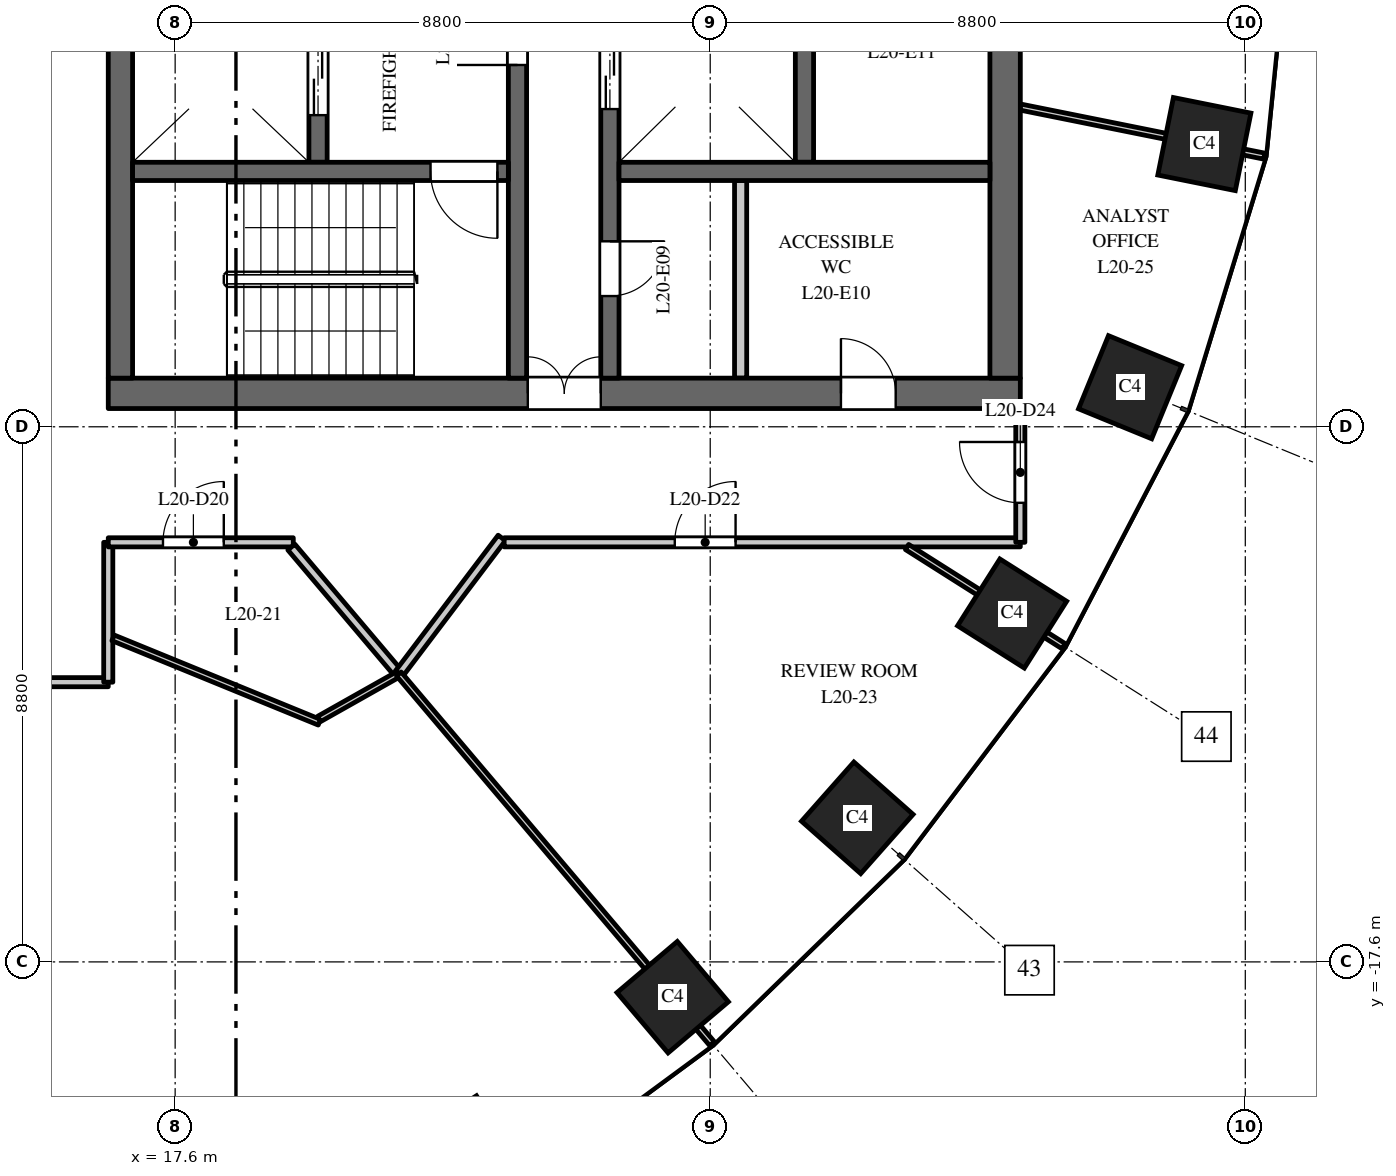
"""IFC4 building model, lengths in metres.
Left out: names, types, materials, properties, quantities, classifications, styles, units other than length and angle.
Written with IfcOpenShell. Run it as: python <this file> out.ifc"""

import sys

from ifc_helpers import new_model, si_unit, direction, frame, frame_2d, origin, origin_2d, place, context, subcontext, project, spatial, rectangle, extrude, element, fill, save


model = new_model("IFC4")
c1 = context("Model", 3, precision=1e-05, world=origin(), true_north=direction((0.0, 1.0)))
c2 = subcontext(c1, "Body", "Model", "MODEL_VIEW")
j1 = project(units=[si_unit("LENGTHUNIT", "METRE"), si_unit("PLANEANGLEUNIT", "RADIAN")], contexts=[c1])
p1 = place(None, origin())
s1 = spatial("IfcSite", under=j1, at=p1, CompositionType="ELEMENT")
p2 = place(p1, origin())
s2 = spatial("IfcBuilding", under=s1, at=p2, CompositionType="ELEMENT")
p3 = place(p2, frame((0.0, 0.0, 92.0)))
s3 = spatial("IfcBuildingStorey", under=s2, at=p3, CompositionType="ELEMENT", Elevation=92.0)
for number, where, z_axis, x_axis in (
    (1, (25.783, -18.18, 0.0), (0.0, 0.0, 1.0), (0.763, 0.646, 0.0)),
    (2, (28.819, -15.23, 0.0), (0.0, 0.0, 1.0), (0.663, 0.749, 0.0)),
    (3, (31.365, -11.871, 0.0), (0.0, 0.0, 1.0), (0.535, 0.845, 0.0)),
    (4, (33.305, -8.149, 0.0), (0.0, 0.0, 1.0), (0.379, 0.925, 0.0)),
    (5, (34.527, -4.151, 0.0), (0.0, 0.0, 1.0), (0.197, 0.98, 0.0)),
):
    element("IfcColumn", number, at=place(p3, frame(where, z_axis=z_axis, x_axis=x_axis)), inside=s3, PredefinedType="COLUMN", context=c2, shape_type="SweptSolid", body=[
        extrude(rectangle(XDim=1.3, YDim=1.3, at=origin_2d()), origin(), (0.0, 0.0, 1.0), 4.0),
    ])
p4 = place(p3, frame((16.5, -8.25, 0.0), z_axis=(0.0, 0.0, 1.0), x_axis=(1.0, 0.0, 0.0)))
e6 = element("IfcWall", 6, at=p4, inside=s3, PredefinedType="SHEAR", context=c2, shape_type="SweptSolid", body=[
    extrude(rectangle(XDim=15.0, YDim=0.5, at=frame_2d((7.5, 0.0))), origin(), (0.0, 0.0, 1.0), 3.7),
])
p5 = place(p4, frame((6.9, 0.0, 0.0)))
e7 = element("IfcOpeningElement", 7, at=p5, cuts=e6, PredefinedType="OPENING", context=c2, shape_type="SweptSolid", body=[
    extrude(rectangle(XDim=1.2, YDim=2.1, at=frame_2d((0.6, 1.05))), frame((0.0, 0.26, 0.0), z_axis=(0.0, -1.0, 0.0), x_axis=(1.0, 0.0, 0.0)), (0.0, 0.0, 1.0), 0.52),
])
p6 = place(p4, frame((12.05, 0.0, 0.0)))
e8 = element("IfcOpeningElement", 8, at=p6, cuts=e6, PredefinedType="OPENING", context=c2, shape_type="SweptSolid", body=[
    extrude(rectangle(XDim=0.9, YDim=2.1, at=frame_2d((0.45, 1.05))), frame((0.0, 0.26, 0.0), z_axis=(0.0, -1.0, 0.0), x_axis=(1.0, 0.0, 0.0)), (0.0, 0.0, 1.0), 0.52),
])
p7 = place(p3, frame((27.95, -4.45, 0.0), z_axis=(0.0, 0.0, 1.0), x_axis=(0.0, 1.0, 0.0)))
e9 = element("IfcWall", 9, at=p7, inside=s3, PredefinedType="SHEAR", context=c2, shape_type="SweptSolid", body=[
    extrude(rectangle(XDim=8.9, YDim=0.3, at=frame_2d((4.45, 0.0))), origin(), (0.0, 0.0, 1.0), 3.7),
])
p8 = place(p3, frame((19.95, -4.45, 0.0), z_axis=(0.0, 0.0, 1.0), x_axis=(0.0, 1.0, 0.0)))
e10 = element("IfcWall", 10, at=p8, inside=s3, PredefinedType="SHEAR", context=c2, shape_type="SweptSolid", body=[
    extrude(rectangle(XDim=8.9, YDim=0.3, at=frame_2d((4.45, 0.0))), origin(), (0.0, 0.0, 1.0), 3.7),
])
p9 = place(p8, frame((0.775, 0.0, 0.0)))
e11 = element("IfcOpeningElement", 11, at=p9, cuts=e10, PredefinedType="OPENING", context=c2, shape_type="SweptSolid", body=[
    extrude(rectangle(XDim=1.2, YDim=2.1, at=frame_2d((0.6, 1.05))), frame((0.0, 0.16, 0.0), z_axis=(0.0, -1.0, 0.0), x_axis=(1.0, 0.0, 0.0)), (0.0, 0.0, 1.0), 0.32),
])
p10 = place(p8, frame((4.62, 0.0, 0.0)))
e12 = element("IfcOpeningElement", 12, at=p10, cuts=e10, PredefinedType="OPENING", context=c2, shape_type="SweptSolid", body=[
    extrude(rectangle(XDim=0.9, YDim=2.1, at=frame_2d((0.45, 1.05))), frame((0.0, 0.16, 0.0), z_axis=(0.0, -1.0, 0.0), x_axis=(1.0, 0.0, 0.0)), (0.0, 0.0, 1.0), 0.32),
])
p11 = place(p8, frame((6.1, 0.0, 0.0)))
e13 = element("IfcOpeningElement", 13, at=p11, cuts=e10, PredefinedType="OPENING", context=c2, shape_type="SweptSolid", body=[
    extrude(rectangle(XDim=0.9, YDim=2.1, at=frame_2d((0.45, 1.05))), frame((0.0, 0.16, 0.0), z_axis=(0.0, -1.0, 0.0), x_axis=(1.0, 0.0, 0.0)), (0.0, 0.0, 1.0), 0.32),
])
p12 = place(p8, frame((7.725, 0.0, 0.0)))
e14 = element("IfcOpeningElement", 14, at=p12, cuts=e10, PredefinedType="OPENING", context=c2, shape_type="SweptSolid", body=[
    extrude(rectangle(XDim=0.9, YDim=2.1, at=frame_2d((0.45, 1.05))), frame((0.0, 0.16, 0.0), z_axis=(0.0, -1.0, 0.0), x_axis=(1.0, 0.0, 0.0)), (0.0, 0.0, 1.0), 0.32),
])
p13 = place(p3, frame((24.75, -8.0, 0.0), z_axis=(0.0, 0.0, 1.0), x_axis=(0.0, 1.0, 0.0)))
e15 = element("IfcWall", 15, at=p13, inside=s3, PredefinedType="SHEAR", context=c2, shape_type="SweptSolid", body=[
    extrude(rectangle(XDim=16.0, YDim=0.3, at=frame_2d((8.0, 0.0))), origin(), (0.0, 0.0, 1.0), 3.7),
])
p14 = place(p13, frame((4.425, 0.0, 0.0)))
e16 = element("IfcOpeningElement", 16, at=p14, cuts=e15, PredefinedType="OPENING", context=c2, shape_type="SweptSolid", body=[
    extrude(rectangle(XDim=1.1, YDim=2.1, at=frame_2d((0.55, 1.05))), frame((0.0, 0.16, 0.0), z_axis=(0.0, -1.0, 0.0), x_axis=(1.0, 0.0, 0.0)), (0.0, 0.0, 1.0), 0.32),
])
p15 = place(p13, frame((7.45, 0.0, 0.0)))
e17 = element("IfcOpeningElement", 17, at=p15, cuts=e15, PredefinedType="OPENING", context=c2, shape_type="SweptSolid", body=[
    extrude(rectangle(XDim=1.1, YDim=2.1, at=frame_2d((0.55, 1.05))), frame((0.0, 0.16, 0.0), z_axis=(0.0, -1.0, 0.0), x_axis=(1.0, 0.0, 0.0)), (0.0, 0.0, 1.0), 0.32),
])
p16 = place(p13, frame((10.425, 0.0, 0.0)))
e18 = element("IfcOpeningElement", 18, at=p16, cuts=e15, PredefinedType="OPENING", context=c2, shape_type="SweptSolid", body=[
    extrude(rectangle(XDim=1.2, YDim=2.1, at=frame_2d((0.6, 1.05))), frame((0.0, 0.16, 0.0), z_axis=(0.0, -1.0, 0.0), x_axis=(1.0, 0.0, 0.0)), (0.0, 0.0, 1.0), 0.32),
])
p17 = place(p13, frame((13.75, 0.0, 0.0)))
e19 = element("IfcOpeningElement", 19, at=p17, cuts=e15, PredefinedType="OPENING", context=c2, shape_type="SweptSolid", body=[
    extrude(rectangle(XDim=0.9, YDim=2.1, at=frame_2d((0.45, 1.05))), frame((0.0, 0.16, 0.0), z_axis=(0.0, -1.0, 0.0), x_axis=(1.0, 0.0, 0.0)), (0.0, 0.0, 1.0), 0.32),
])
p18 = place(p13, frame((1.35, 0.0, 0.0)))
e20 = element("IfcOpeningElement", 20, at=p18, cuts=e15, PredefinedType="OPENING", context=c2, shape_type="SweptSolid", body=[
    extrude(rectangle(XDim=0.9, YDim=2.1, at=frame_2d((0.45, 1.05))), frame((0.0, 0.16, 0.0), z_axis=(0.0, -1.0, 0.0), x_axis=(1.0, 0.0, 0.0)), (0.0, 0.0, 1.0), 0.32),
])
p19 = place(p3, frame((16.7, -8.0, 0.0), z_axis=(0.0, 0.0, 1.0), x_axis=(0.0, 1.0, 0.0)))
e21 = element("IfcWall", 21, at=p19, inside=s3, PredefinedType="SHEAR", context=c2, shape_type="SweptSolid", body=[
    extrude(rectangle(XDim=16.0, YDim=0.4, at=frame_2d((8.0, 0.0))), origin(), (0.0, 0.0, 1.0), 3.7),
])
p20 = place(p3, frame((31.25, -8.0, 0.0), z_axis=(0.0, 0.0, 1.0), x_axis=(0.0, 1.0, 0.0)))
e22 = element("IfcWall", 22, at=p20, inside=s3, PredefinedType="SHEAR", context=c2, shape_type="SweptSolid", body=[
    extrude(rectangle(XDim=16.0, YDim=0.5, at=frame_2d((8.0, 0.0))), origin(), (0.0, 0.0, 1.0), 3.7),
])
p21 = place(p3, frame((26.9, -8.0, 0.0), z_axis=(0.0, 0.0, 1.0), x_axis=(0.0, 1.0, 0.0)))
e23 = element("IfcWall", 23, at=p21, inside=s3, PredefinedType="PARTITIONING", context=c2, shape_type="SweptSolid", body=[
    extrude(rectangle(XDim=3.25, YDim=0.2, at=frame_2d((1.625, 0.0))), origin(), (0.0, 0.0, 1.0), 3.7),
])
p22 = place(p3, frame((24.9, -4.6, 0.0), z_axis=(0.0, 0.0, 1.0), x_axis=(1.0, 0.0, 0.0)))
e24 = element("IfcWall", 24, at=p22, inside=s3, PredefinedType="SHEAR", context=c2, shape_type="SweptSolid", body=[
    extrude(rectangle(XDim=6.1, YDim=0.3, at=frame_2d((3.05, 0.0))), origin(), (0.0, 0.0, 1.0), 3.7),
])
p23 = place(p3, frame((23.23, -8.0, 0.0), z_axis=(0.0, 0.0, 1.0), x_axis=(0.0, 1.0, 0.0)))
e25 = element("IfcWall", 25, at=p23, inside=s3, PredefinedType="SHEAR", context=c2, shape_type="SweptSolid", body=[
    extrude(rectangle(XDim=7.875, YDim=0.3, at=frame_2d((3.938, 0.0))), origin(), (0.0, 0.0, 1.0), 3.7),
])
p24 = place(p23, frame((5.15, 0.0, 0.0)))
e26 = element("IfcOpeningElement", 26, at=p24, cuts=e25, PredefinedType="OPENING", context=c2, shape_type="SweptSolid", body=[
    extrude(rectangle(XDim=1.1, YDim=2.1, at=frame_2d((0.55, 1.05))), frame((0.0, 0.16, 0.0), z_axis=(0.0, -1.0, 0.0), x_axis=(1.0, 0.0, 0.0)), (0.0, 0.0, 1.0), 0.32),
])
p25 = place(p3, frame((16.9, -4.6, 0.0), z_axis=(0.0, 0.0, 1.0), x_axis=(1.0, 0.0, 0.0)))
e27 = element("IfcWall", 27, at=p25, inside=s3, PredefinedType="SHEAR", context=c2, shape_type="SweptSolid", body=[
    extrude(rectangle(XDim=6.18, YDim=0.3, at=frame_2d((3.09, 0.0))), origin(), (0.0, 0.0, 1.0), 3.7),
])
p26 = place(p25, frame((4.9, 0.0, 0.0)))
e28 = element("IfcOpeningElement", 28, at=p26, cuts=e27, PredefinedType="OPENING", context=c2, shape_type="SweptSolid", body=[
    extrude(rectangle(XDim=1.1, YDim=2.1, at=frame_2d((0.55, 1.05))), frame((0.0, 0.16, 0.0), z_axis=(0.0, -1.0, 0.0), x_axis=(1.0, 0.0, 0.0)), (0.0, 0.0, 1.0), 0.32),
])
p27 = place(p3, frame((7.499, -13.0, 0.0), z_axis=(0.0, 0.0, 1.0), x_axis=(1.0, 0.0, 0.0)))
e29 = element("IfcWall", 29, at=p27, inside=s3, PredefinedType="PARTITIONING", context=c2, shape_type="SweptSolid", body=[
    extrude(rectangle(XDim=9.001, YDim=0.15, at=frame_2d((4.5, 0.0))), origin(), (0.0, 0.0, 1.0), 2.85),
])
p28 = place(p27, frame((3.884, 0.0, 0.0)))
e30 = element("IfcOpeningElement", 30, at=p28, cuts=e29, PredefinedType="OPENING", context=c2, shape_type="SweptSolid", body=[
    extrude(rectangle(XDim=1.0, YDim=2.1, at=frame_2d((0.5, 1.05))), frame((0.0, 0.085, 0.0), z_axis=(0.0, -1.0, 0.0), x_axis=(1.0, 0.0, 0.0)), (0.0, 0.0, 1.0), 0.17),
])
p29 = place(p3, frame((16.5, -13.0, 0.0), z_axis=(0.0, 0.0, 1.0), x_axis=(0.0, 1.0, 0.0)))
e31 = element("IfcWall", 31, at=p29, inside=s3, PredefinedType="PARTITIONING", context=c2, shape_type="SweptSolid", body=[
    extrude(rectangle(XDim=2.3, YDim=0.15, at=frame_2d((1.15, 0.0))), origin(), (0.0, 0.0, 1.0), 3.7),
])
p30 = place(p3, frame((16.5, -10.7, 0.0), z_axis=(0.0, 0.0, 1.0), x_axis=(1.0, 0.0, 0.0)))
e32 = element("IfcWall", 32, at=p30, inside=s3, PredefinedType="PARTITIONING", context=c2, shape_type="SweptSolid", body=[
    extrude(rectangle(XDim=3.043, YDim=0.15, at=frame_2d((1.521, 0.0))), origin(), (0.0, 0.0, 1.0), 3.7),
])
p31 = place(p30, frame((0.9, 0.0, 0.0)))
e33 = element("IfcOpeningElement", 33, at=p31, cuts=e32, PredefinedType="OPENING", context=c2, shape_type="SweptSolid", body=[
    extrude(rectangle(XDim=1.0, YDim=2.1, at=frame_2d((0.5, 1.05))), frame((0.0, 0.085, 0.0), z_axis=(0.0, -1.0, 0.0), x_axis=(1.0, 0.0, 0.0)), (0.0, 0.0, 1.0), 0.17),
])
p32 = place(p3, frame((16.579, -12.271, 0.0), z_axis=(0.0, 0.0, 1.0), x_axis=(0.925550138862, -0.378625065801, 0.0)))
e34 = element("IfcWall", 34, at=p32, inside=s3, PredefinedType="PARTITIONING", context=c2, shape_type="SweptSolid", body=[
    extrude(rectangle(XDim=3.666, YDim=0.1, at=frame_2d((1.833, 0.0))), origin(), (0.0, 0.0, 1.0), 3.7),
])
p33 = place(p3, frame((19.511, -10.778, 0.0), z_axis=(0.0, 0.0, 1.0), x_axis=(0.64641426768, -0.762986628021, 0.0)))
e35 = element("IfcWall", 35, at=p33, inside=s3, PredefinedType="PARTITIONING", context=c2, shape_type="SweptSolid", body=[
    extrude(rectangle(XDim=2.735, YDim=0.15, at=frame_2d((1.368, 0.0))), origin(), (0.0, 0.0, 1.0), 3.7),
])
p34 = place(p3, frame((19.969, -13.604, 0.0), z_axis=(0.0, 0.0, 1.0), x_axis=(0.870976686736, 0.491324344158, 0.0)))
e36 = element("IfcWall", 36, at=p34, inside=s3, PredefinedType="PARTITIONING", context=c2, shape_type="SweptSolid", body=[
    extrude(rectangle(XDim=1.504, YDim=0.1, at=frame_2d((0.752, 0.0))), origin(), (0.0, 0.0, 1.0), 3.7),
])
p35 = place(p3, frame((21.279, -12.865, 0.0), z_axis=(0.0, 0.0, 1.0), x_axis=(0.603433696796, 0.797413176196, 0.0)))
e37 = element("IfcWall", 37, at=p35, inside=s3, PredefinedType="PARTITIONING", context=c2, shape_type="SweptSolid", body=[
    extrude(rectangle(XDim=2.805, YDim=0.15, at=frame_2d((1.403, 0.0))), origin(), (0.0, 0.0, 1.0), 2.75),
])
p36 = place(p3, frame((21.279, -12.865, 0.0), z_axis=(0.0, 0.0, 1.0), x_axis=(0.646395355102, -0.763002650652, 0.0)))
e38 = element("IfcWall", 38, at=p36, inside=s3, PredefinedType="PARTITIONING", context=c2, shape_type="SweptSolid", body=[
    extrude(rectangle(XDim=7.969, YDim=0.1, at=frame_2d((3.984, 0.0))), origin(), (0.0, 0.0, 1.0), 2.9),
])
p37 = place(p3, frame((23.011, -10.7, 0.0), z_axis=(0.0, 0.0, 1.0), x_axis=(1.0, 0.0, 0.0)))
e39 = element("IfcWall", 39, at=p37, inside=s3, PredefinedType="PARTITIONING", context=c2, shape_type="SweptSolid", body=[
    extrude(rectangle(XDim=8.489, YDim=0.15, at=frame_2d((4.245, 0.0))), origin(), (0.0, 0.0, 1.0), 2.9),
])
p38 = place(p37, frame((2.806, 0.0, 0.0)))
e40 = element("IfcOpeningElement", 40, at=p38, cuts=e39, PredefinedType="OPENING", context=c2, shape_type="SweptSolid", body=[
    extrude(rectangle(XDim=1.0, YDim=2.1, at=frame_2d((0.5, 1.05))), frame((0.0, 0.085, 0.0), z_axis=(0.0, -1.0, 0.0), x_axis=(1.0, 0.0, 0.0)), (0.0, 0.0, 1.0), 0.17),
])
p39 = place(p3, frame((29.637, -10.777, 0.0), z_axis=(0.0, 0.0, 1.0), x_axis=(0.844810627195, -0.535065420467, 0.0)))
e41 = element("IfcWall", 41, at=p39, inside=s3, PredefinedType="PARTITIONING", context=c2, shape_type="SweptSolid", body=[
    extrude(rectangle(XDim=3.048, YDim=0.1, at=frame_2d((1.524, 0.0))), origin(), (0.0, 0.0, 1.0), 2.9),
])
p40 = place(p3, frame((31.5, -10.7, 0.0), z_axis=(0.0, 0.0, 1.0), x_axis=(0.0, 1.0, 0.0)))
e42 = element("IfcWall", 42, at=p40, inside=s3, PredefinedType="PARTITIONING", context=c2, shape_type="SweptSolid", body=[
    extrude(rectangle(XDim=2.2, YDim=0.15, at=frame_2d((1.1, 0.0))), origin(), (0.0, 0.0, 1.0), 2.9),
])
p41 = place(p40, frame((0.65, 0.0, 0.0)))
e43 = element("IfcOpeningElement", 43, at=p41, cuts=e42, PredefinedType="OPENING", context=c2, shape_type="SweptSolid", body=[
    extrude(rectangle(XDim=1.0, YDim=2.1, at=frame_2d((0.5, 1.05))), frame((0.0, 0.085, 0.0), z_axis=(0.0, -1.0, 0.0), x_axis=(1.0, 0.0, 0.0)), (0.0, 0.0, 1.0), 0.17),
])
p42 = place(p3, frame((31.5, -3.542, 0.0), z_axis=(0.0, 0.0, 1.0), x_axis=(0.980357474535, -0.197228857227, 0.0)))
e44 = element("IfcWall", 44, at=p42, inside=s3, PredefinedType="PARTITIONING", context=c2, shape_type="SweptSolid", body=[
    extrude(rectangle(XDim=4.092, YDim=0.1, at=frame_2d((2.046, 0.0))), origin(), (0.0, 0.0, 1.0), 2.9),
])
p43 = place(p9, origin())
e45 = element("IfcDoor", 45, at=p43, inside=s3, OperationType="DOUBLE_DOOR_SLIDING", PredefinedType="DOOR", context=c2, shape_type="SweptSolid", body=[
    extrude(rectangle(XDim=1.2, YDim=2.1, at=frame_2d((0.6, 1.05))), frame((0.0, 0.025, 0.0), z_axis=(0.0, -1.0, 0.0), x_axis=(1.0, 0.0, 0.0)), (0.0, 0.0, 1.0), 0.05),
])
fill(e11, e45)
p44 = place(p14, origin())
e46 = element("IfcDoor", 46, at=p44, inside=s3, OperationType="DOUBLE_DOOR_SLIDING", PredefinedType="DOOR", context=c2, shape_type="SweptSolid", body=[
    extrude(rectangle(XDim=1.1, YDim=2.1, at=frame_2d((0.55, 1.05))), frame((0.0, 0.025, 0.0), z_axis=(0.0, -1.0, 0.0), x_axis=(1.0, 0.0, 0.0)), (0.0, 0.0, 1.0), 0.05),
])
fill(e16, e46)
p45 = place(p26, origin())
e47 = element("IfcDoor", 47, at=p45, inside=s3, OperationType="SINGLE_SWING_RIGHT", PredefinedType="DOOR", context=c2, shape_type="SweptSolid", body=[
    extrude(rectangle(XDim=1.1, YDim=2.1, at=frame_2d((0.55, 1.05))), frame((0.0, 0.025, 0.0), z_axis=(0.0, -1.0, 0.0), x_axis=(1.0, 0.0, 0.0)), (0.0, 0.0, 1.0), 0.05),
])
fill(e28, e47)
p46 = place(p24, origin())
e48 = element("IfcDoor", 48, at=p46, inside=s3, OperationType="SINGLE_SWING_RIGHT", PredefinedType="DOOR", context=c2, shape_type="SweptSolid", body=[
    extrude(rectangle(XDim=1.1, YDim=2.1, at=frame_2d((0.55, 1.05))), frame((0.0, 0.025, 0.0), z_axis=(0.0, -1.0, 0.0), x_axis=(1.0, 0.0, 0.0)), (0.0, 0.0, 1.0), 0.05),
])
fill(e26, e48)
p47 = place(p5, origin())
e49 = element("IfcDoor", 49, at=p47, inside=s3, OperationType="DOUBLE_DOOR_DOUBLE_SWING", PredefinedType="DOOR", context=c2, shape_type="SweptSolid", body=[
    extrude(rectangle(XDim=1.2, YDim=2.1, at=frame_2d((0.6, 1.05))), frame((0.0, 0.025, 0.0), z_axis=(0.0, -1.0, 0.0), x_axis=(1.0, 0.0, 0.0)), (0.0, 0.0, 1.0), 0.05),
])
fill(e7, e49)
p48 = place(p18, origin())
e50 = element("IfcDoor", 50, at=p48, inside=s3, OperationType="SINGLE_SWING_RIGHT", PredefinedType="DOOR", context=c2, shape_type="SweptSolid", body=[
    extrude(rectangle(XDim=0.9, YDim=2.1, at=frame_2d((0.45, 1.05))), frame((0.0, 0.025, 0.0), z_axis=(0.0, -1.0, 0.0), x_axis=(1.0, 0.0, 0.0)), (0.0, 0.0, 1.0), 0.05),
])
fill(e20, e50)
p49 = place(p6, origin())
e51 = element("IfcDoor", 51, at=p49, inside=s3, OperationType="SINGLE_SWING_RIGHT", PredefinedType="DOOR", context=c2, shape_type="SweptSolid", body=[
    extrude(rectangle(XDim=0.9, YDim=2.1, at=frame_2d((0.45, 1.05))), frame((0.0, 0.025, 0.0), z_axis=(0.0, -1.0, 0.0), x_axis=(1.0, 0.0, 0.0)), (0.0, 0.0, 1.0), 0.05),
])
fill(e8, e51)
p50 = place(p31, origin())
e52 = element("IfcDoor", 52, at=p50, inside=s3, OperationType="SINGLE_SWING_RIGHT", PredefinedType="DOOR", context=c2, shape_type="SweptSolid", body=[
    extrude(rectangle(XDim=1.0, YDim=2.1, at=frame_2d((0.5, 1.05))), frame((0.0, 0.025, 0.0), z_axis=(0.0, -1.0, 0.0), x_axis=(1.0, 0.0, 0.0)), (0.0, 0.0, 1.0), 0.05),
])
fill(e33, e52)
p51 = place(p38, origin())
e53 = element("IfcDoor", 53, at=p51, inside=s3, OperationType="SINGLE_SWING_RIGHT", PredefinedType="DOOR", context=c2, shape_type="SweptSolid", body=[
    extrude(rectangle(XDim=1.0, YDim=2.1, at=frame_2d((0.5, 1.05))), frame((0.0, 0.025, 0.0), z_axis=(0.0, -1.0, 0.0), x_axis=(1.0, 0.0, 0.0)), (0.0, 0.0, 1.0), 0.05),
])
fill(e40, e53)
p52 = place(p41, origin())
e54 = element("IfcDoor", 54, at=p52, inside=s3, OperationType="SINGLE_SWING_RIGHT", PredefinedType="DOOR", context=c2, shape_type="SweptSolid", body=[
    extrude(rectangle(XDim=1.0, YDim=2.1, at=frame_2d((0.5, 1.05))), frame((0.0, 0.025, 0.0), z_axis=(0.0, -1.0, 0.0), x_axis=(1.0, 0.0, 0.0)), (0.0, 0.0, 1.0), 0.05),
])
fill(e43, e54)
save(model, sys.argv[1])
